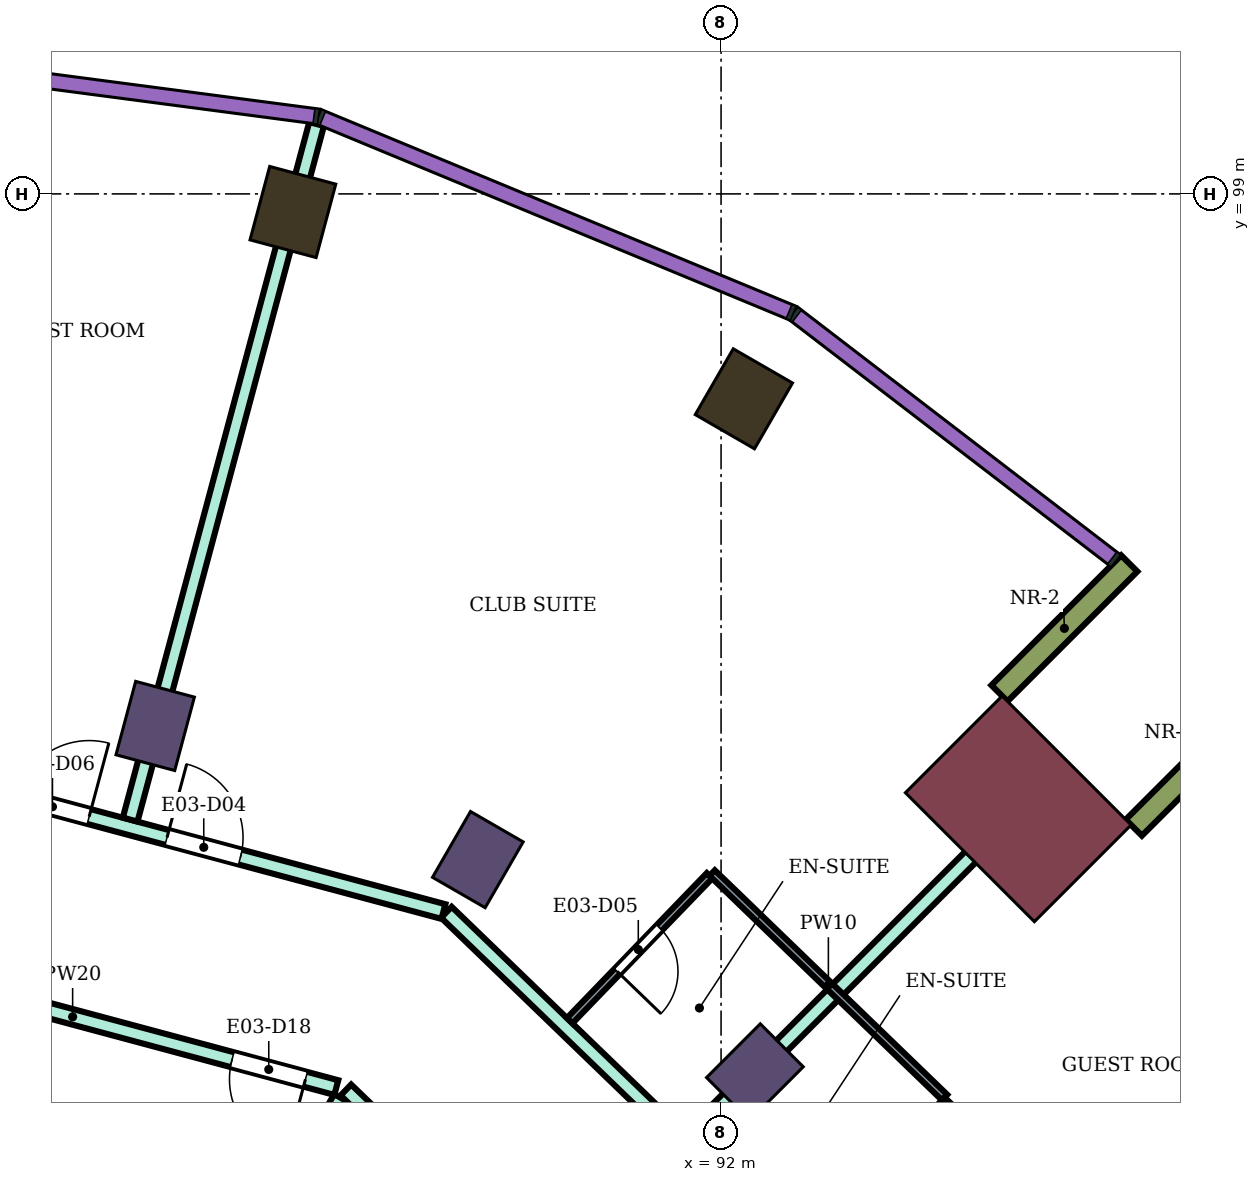
"""IFC4 building model, lengths in metres.
Left out: names, types, materials, properties, quantities, classifications, styles, units other than length and angle.
Written with IfcOpenShell. Run it as: python <this file> out.ifc"""

import sys

from ifc_helpers import new_model, si_unit, direction, frame, frame_2d, origin, origin_2d, place, context, subcontext, project, spatial, rectangle, extrude, element, fill, save


model = new_model("IFC4")
c1 = context("Model", 3, precision=1e-05, world=origin(), true_north=direction((0.0, 1.0)))
c2 = subcontext(c1, "Body", "Model", "MODEL_VIEW")
j1 = project(units=[si_unit("LENGTHUNIT", "METRE"), si_unit("PLANEANGLEUNIT", "RADIAN")], contexts=[c1])
p1 = place(None, origin())
s1 = spatial("IfcSite", under=j1, at=p1, CompositionType="ELEMENT")
p2 = place(p1, origin())
s2 = spatial("IfcBuilding", under=s1, at=p2, CompositionType="ELEMENT")
p3 = place(p2, frame((0.0, 0.0, 145.8)))
s3 = spatial("IfcBuildingStorey", under=s2, at=p3, CompositionType="ELEMENT", Elevation=145.8)
for number, where, z_axis, x_axis in (
    (1, (92.3, 96.304, 0.0), (0.0, 0.0, 1.0), (0.5, 0.866, 0.0)),
    (2, (86.367, 98.762, 0.0), (0.0, 0.0, 1.0), (0.259, 0.966, 0.0)),
):
    element("IfcColumn", number, at=place(p3, frame(where, z_axis=z_axis, x_axis=x_axis)), inside=s3, PredefinedType="COLUMN", context=c2, shape_type="SweptSolid", body=[
        extrude(rectangle(XDim=1.0, YDim=0.9, at=origin_2d()), origin(), (0.0, 0.0, 1.0), 3.9),
    ])
for number, where, z_axis, x_axis in (
    (3, (92.445, 87.445, 0.0), (0.0, 0.0, 1.0), (0.707, 0.707, 0.0)),
    (4, (88.8, 90.242, 0.0), (0.0, 0.0, 1.0), (0.5, 0.866, 0.0)),
    (5, (84.555, 92.0, 0.0), (0.0, 0.0, 1.0), (0.259, 0.966, 0.0)),
):
    element("IfcColumn", number, at=place(p3, frame(where, z_axis=z_axis, x_axis=x_axis)), inside=s3, PredefinedType="COLUMN", context=c2, shape_type="SweptSolid", body=[
        extrude(rectangle(XDim=1.0, YDim=0.8, at=origin_2d()), origin(), (0.0, 0.0, 1.0), 3.9),
    ])
p4 = place(p3, frame((95.91, 90.91, 0.0), z_axis=(0.0, 0.0, 1.0), x_axis=(0.707106781187, 0.707106781187, 0.0)))
e6 = element("IfcColumn", 6, at=p4, inside=s3, PredefinedType="COLUMN", context=c2, shape_type="SweptSolid", body=[
    extrude(rectangle(XDim=1.8, YDim=2.4, at=origin_2d()), origin(), (0.0, 0.0, 1.0), 3.9),
])
for number, where, z_axis, x_axis in (
    (7, (97.43, 90.662, 0.0), (0.0, 0.0, 1.0), (0.707, 0.707, 0.0)),
    (8, (95.662, 92.43, 0.0), (0.0, 0.0, 1.0), (0.707, 0.707, 0.0)),
):
    element("IfcWall", number, at=place(p3, frame(where, z_axis=z_axis, x_axis=x_axis)), inside=s3, PredefinedType="NOTDEFINED", context=c2, shape_type="SweptSolid", body=[
        extrude(rectangle(XDim=2.416, YDim=0.3, at=frame_2d((1.208, 0.0))), origin(), (0.0, 0.0, 1.0), 3.9),
    ])
p5 = place(p3, frame((80.0, 89.104, 0.0), z_axis=(0.0, 0.0, 1.0), x_axis=(0.965854247166, -0.25908603442, 0.0)))
e9 = element("IfcWall", 9, at=p5, inside=s3, PredefinedType="PARTITIONING", context=c2, shape_type="SweptSolid", body=[
    extrude(rectangle(XDim=7.183, YDim=0.2, at=frame_2d((3.592, 0.0))), origin(), (0.0, 0.0, 1.0), 3.45),
])
p6 = place(p5, frame((5.763, 0.0, 0.0)))
e10 = element("IfcOpeningElement", 10, at=p6, cuts=e9, PredefinedType="OPENING", context=c2, shape_type="SweptSolid", body=[
    extrude(rectangle(XDim=1.0, YDim=2.1, at=frame_2d((0.5, 1.05))), frame((0.0, 0.11, 0.0), z_axis=(0.0, -1.0, 0.0), x_axis=(1.0, 0.0, 0.0)), (0.0, 0.0, 1.0), 0.22),
])
p7 = place(p3, frame((80.0, 91.796, 0.0), z_axis=(0.0, 0.0, 1.0), x_axis=(0.965891796243, -0.258946013582, 0.0)))
e11 = element("IfcWall", 11, at=p7, inside=s3, PredefinedType="PARTITIONING", context=c2, shape_type="SweptSolid", body=[
    extrude(rectangle(XDim=8.642, YDim=0.2, at=frame_2d((4.321, 0.0))), origin(), (0.0, 0.0, 1.0), 3.45),
])
p8 = place(p7, frame((4.877, 0.0, 0.0)))
e12 = element("IfcOpeningElement", 12, at=p8, cuts=e11, PredefinedType="OPENING", context=c2, shape_type="SweptSolid", body=[
    extrude(rectangle(XDim=1.0, YDim=2.1, at=frame_2d((0.5, 1.05))), frame((0.0, 0.11, 0.0), z_axis=(0.0, -1.0, 0.0), x_axis=(1.0, 0.0, 0.0)), (0.0, 0.0, 1.0), 0.22),
])
p9 = place(p7, frame((2.817, 0.0, 0.0)))
e13 = element("IfcOpeningElement", 13, at=p9, cuts=e11, PredefinedType="OPENING", context=c2, shape_type="SweptSolid", body=[
    extrude(rectangle(XDim=1.0, YDim=2.1, at=frame_2d((0.5, 1.05))), frame((0.0, 0.11, 0.0), z_axis=(0.0, -1.0, 0.0), x_axis=(1.0, 0.0, 0.0)), (0.0, 0.0, 1.0), 0.22),
])
p10 = place(p3, frame((83.854, 81.665, 0.0), z_axis=(0.0, 0.0, 1.0), x_axis=(0.500241355856, 0.865886012066, 0.0)))
e14 = element("IfcWall", 14, at=p10, inside=s3, PredefinedType="PARTITIONING", context=c2, shape_type="SweptSolid", body=[
    extrude(rectangle(XDim=6.285, YDim=0.2, at=frame_2d((3.143, 0.0))), origin(), (0.0, 0.0, 1.0), 3.45),
])
p11 = place(p3, frame((84.226, 90.768, 0.0), z_axis=(0.0, 0.0, 1.0), x_axis=(0.258891088655, 0.965906519398, 0.0)))
e15 = element("IfcWall", 15, at=p11, inside=s3, PredefinedType="PARTITIONING", context=c2, shape_type="SweptSolid", body=[
    extrude(rectangle(XDim=9.474, YDim=0.2, at=frame_2d((4.737, 0.0))), origin(), (0.0, 0.0, 1.0), 3.45),
])
p12 = place(p3, frame((87.064, 87.211, 0.0), z_axis=(0.0, 0.0, 1.0), x_axis=(0.719562412484, -0.694427774891, 0.0)))
e16 = element("IfcWall", 16, at=p12, inside=s3, PredefinedType="PARTITIONING", context=c2, shape_type="SweptSolid", body=[
    extrude(rectangle(XDim=5.488, YDim=0.2, at=frame_2d((2.744, 0.0))), origin(), (0.0, 0.0, 1.0), 3.45),
])
p13 = place(p12, frame((2.294, 0.0, 0.0)))
e17 = element("IfcOpeningElement", 17, at=p13, cuts=e16, PredefinedType="OPENING", context=c2, shape_type="SweptSolid", body=[
    extrude(rectangle(XDim=0.9, YDim=2.1, at=frame_2d((0.45, 1.05))), frame((0.0, 0.11, 0.0), z_axis=(0.0, -1.0, 0.0), x_axis=(1.0, 0.0, 0.0)), (0.0, 0.0, 1.0), 0.22),
])
p14 = place(p3, frame((88.386, 89.549, 0.0), z_axis=(0.0, 0.0, 1.0), x_axis=(0.719507339337, -0.694484836869, 0.0)))
e18 = element("IfcWall", 18, at=p14, inside=s3, PredefinedType="PARTITIONING", context=c2, shape_type="SweptSolid", body=[
    extrude(rectangle(XDim=6.635, YDim=0.2, at=frame_2d((3.317, 0.0))), origin(), (0.0, 0.0, 1.0), 3.45),
])
p15 = place(p3, frame((91.595, 86.591, 0.0), z_axis=(0.0, 0.0, 1.0), x_axis=(0.707214399597, 0.706999146394, 0.0)))
e19 = element("IfcWall", 19, at=p15, inside=s3, PredefinedType="PARTITIONING", context=c2, shape_type="SweptSolid", body=[
    extrude(rectangle(XDim=6.805, YDim=0.2, at=frame_2d((3.403, 0.0))), origin(), (0.0, 0.0, 1.0), 3.45),
])
p16 = place(p3, frame((90.008, 88.123, 0.0), z_axis=(0.0, 0.0, 1.0), x_axis=(0.694372521817, 0.719615731447, 0.0)))
e20 = element("IfcWall", 20, at=p16, inside=s3, PredefinedType="PARTITIONING", context=c2, shape_type="SweptSolid", body=[
    extrude(rectangle(XDim=2.65, YDim=0.1, at=frame_2d((1.325, 0.0))), origin(), (0.0, 0.0, 1.0), 3.45),
])
p17 = place(p16, frame((0.9, 0.0, 0.0)))
e21 = element("IfcOpeningElement", 21, at=p17, cuts=e20, PredefinedType="OPENING", context=c2, shape_type="SweptSolid", body=[
    extrude(rectangle(XDim=0.8, YDim=2.1, at=frame_2d((0.4, 1.05))), frame((0.0, 0.06, 0.0), z_axis=(0.0, -1.0, 0.0), x_axis=(1.0, 0.0, 0.0)), (0.0, 0.0, 1.0), 0.12),
])
p18 = place(p3, frame((91.883, 90.066, 0.0), z_axis=(0.0, 0.0, 1.0), x_axis=(0.719460839421, -0.694533008963, 0.0)))
e22 = element("IfcWall", 22, at=p18, inside=s3, PredefinedType="PARTITIONING", context=c2, shape_type="SweptSolid", body=[
    extrude(rectangle(XDim=4.25, YDim=0.1, at=frame_2d((2.125, 0.0))), origin(), (0.0, 0.0, 1.0), 3.45),
])
p19 = place(p3, frame((93.103, 85.136, 0.0), z_axis=(0.0, 0.0, 1.0), x_axis=(0.694287838235, 0.719697434815, 0.0)))
e23 = element("IfcWall", 23, at=p19, inside=s3, PredefinedType="PARTITIONING", context=c2, shape_type="SweptSolid", body=[
    extrude(rectangle(XDim=2.7, YDim=0.1, at=frame_2d((1.35, 0.0))), origin(), (0.0, 0.0, 1.0), 3.45),
])
p20 = place(p19, frame((1.05, 0.0, 0.0)))
e24 = element("IfcOpeningElement", 24, at=p20, cuts=e23, PredefinedType="OPENING", context=c2, shape_type="SweptSolid", body=[
    extrude(rectangle(XDim=0.8, YDim=2.1, at=frame_2d((0.4, 1.05))), frame((0.0, 0.06, 0.0), z_axis=(0.0, -1.0, 0.0), x_axis=(1.0, 0.0, 0.0)), (0.0, 0.0, 1.0), 0.12),
])
p21 = place(p3, frame((94.8, 83.545, 0.0), z_axis=(0.0, 0.0, 1.0), x_axis=(0.86602264145, 0.500004784474, 0.0)))
e25 = element("IfcWall", 25, at=p21, inside=s3, PredefinedType="PARTITIONING", context=c2, shape_type="SweptSolid", body=[
    extrude(rectangle(XDim=8.708, YDim=0.1, at=frame_2d((4.354, 0.0))), origin(), (0.0, 0.0, 1.0), 3.45),
])
p22 = place(p21, frame((3.879, 0.0, 0.0)))
e26 = element("IfcOpeningElement", 26, at=p22, cuts=e25, PredefinedType="OPENING", context=c2, shape_type="SweptSolid", body=[
    extrude(rectangle(XDim=0.9, YDim=2.1, at=frame_2d((0.45, 1.05))), frame((0.0, 0.06, 0.0), z_axis=(0.0, -1.0, 0.0), x_axis=(1.0, 0.0, 0.0)), (0.0, 0.0, 1.0), 0.12),
])
p23 = place(p8, origin())
e27 = element("IfcDoor", 27, at=p23, inside=s3, OperationType="SINGLE_SWING_LEFT", PredefinedType="DOOR", context=c2, shape_type="SweptSolid", body=[
    extrude(rectangle(XDim=1.0, YDim=2.1, at=frame_2d((0.5, 1.05))), frame((0.0, 0.025, 0.0), z_axis=(0.0, -1.0, 0.0), x_axis=(1.0, 0.0, 0.0)), (0.0, 0.0, 1.0), 0.05),
])
fill(e12, e27)
p24 = place(p17, frame((0.8, 0.0, 0.0), z_axis=(0.0, 0.0, 1.0), x_axis=(-1.0, 0.0, 0.0)))
e28 = element("IfcDoor", 28, at=p24, inside=s3, OperationType="SINGLE_SWING_RIGHT", PredefinedType="DOOR", context=c2, shape_type="SweptSolid", body=[
    extrude(rectangle(XDim=0.8, YDim=2.1, at=frame_2d((0.4, 1.05))), frame((0.0, 0.025, 0.0), z_axis=(0.0, -1.0, 0.0), x_axis=(1.0, 0.0, 0.0)), (0.0, 0.0, 1.0), 0.05),
])
fill(e21, e28)
p25 = place(p9, origin())
e29 = element("IfcDoor", 29, at=p25, inside=s3, OperationType="SINGLE_SWING_RIGHT", PredefinedType="DOOR", context=c2, shape_type="SweptSolid", body=[
    extrude(rectangle(XDim=1.0, YDim=2.1, at=frame_2d((0.5, 1.05))), frame((0.0, 0.025, 0.0), z_axis=(0.0, -1.0, 0.0), x_axis=(1.0, 0.0, 0.0)), (0.0, 0.0, 1.0), 0.05),
])
fill(e13, e29)
p26 = place(p6, frame((1.0, 0.0, 0.0), z_axis=(0.0, 0.0, 1.0), x_axis=(-1.0, 0.0, 0.0)))
e30 = element("IfcDoor", 30, at=p26, inside=s3, OperationType="SINGLE_SWING_LEFT", PredefinedType="DOOR", context=c2, shape_type="SweptSolid", body=[
    extrude(rectangle(XDim=1.0, YDim=2.1, at=frame_2d((0.5, 1.05))), frame((0.0, 0.025, 0.0), z_axis=(0.0, -1.0, 0.0), x_axis=(1.0, 0.0, 0.0)), (0.0, 0.0, 1.0), 0.05),
])
fill(e10, e30)
save(model, sys.argv[1])
